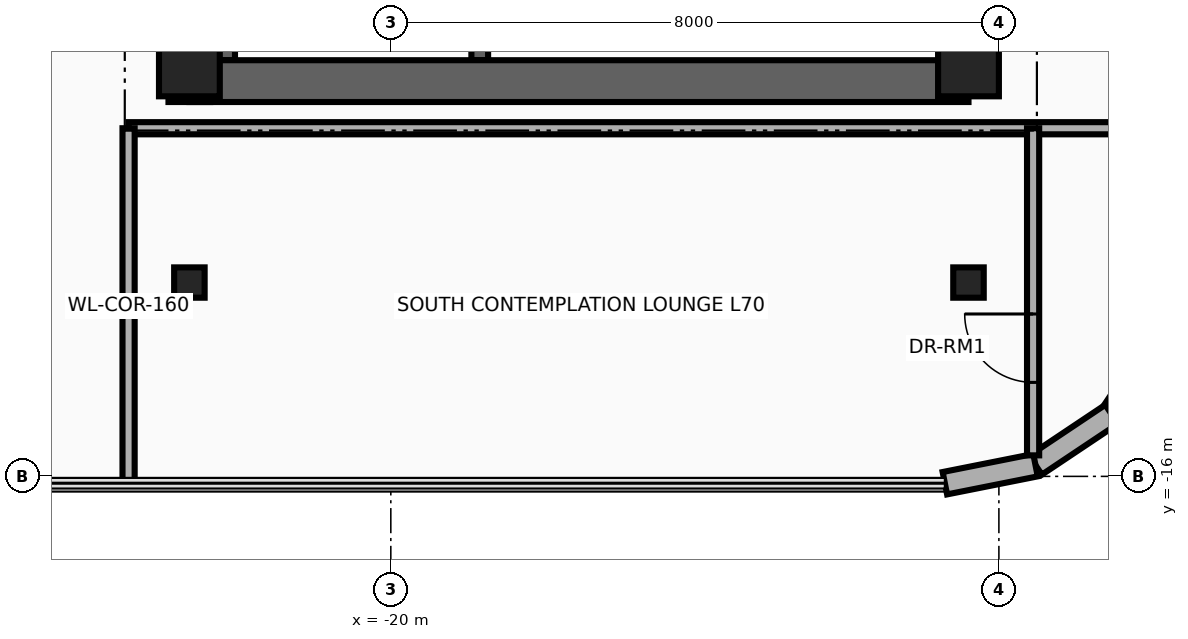
"""IFC4 building model, lengths in metres.
Left out: names, types, materials, properties, quantities, classifications, styles, units other than length and angle.
Written with IfcOpenShell. Run it as: python <this file> out.ifc"""

import sys

from ifc_helpers import new_model, si_unit, direction, frame, frame_2d, origin, origin_2d, place, context, subcontext, project, spatial, rectangle, i_section, extrude, source, transform, mapped, element, fill, save


model = new_model("IFC4")
c1 = context("Model", 3, precision=1e-05, world=origin(), true_north=direction((0.0, 1.0)))
c2 = subcontext(c1, "Body", "Model", "MODEL_VIEW")
j1 = project(units=[si_unit("LENGTHUNIT", "METRE"), si_unit("PLANEANGLEUNIT", "RADIAN")], contexts=[c1])
p1 = place(None, origin())
s1 = spatial("IfcSite", under=j1, at=p1, CompositionType="ELEMENT")
p2 = place(p1, origin())
s2 = spatial("IfcBuilding", under=s1, at=p2, CompositionType="ELEMENT")
p3 = place(p2, frame((0.0, 0.0, 269.5)))
s3 = spatial("IfcBuildingStorey", under=s2, at=p3, CompositionType="ELEMENT", Elevation=269.5)
for number, where, z_axis, x_axis in (
    (1, (-22.16, -10.525, 0.0), (0.0, 0.0, 1.0), (0.0, 1.0, 0.0)),
    (2, (-18.83, -10.525, 0.0), (0.0, 0.0, 1.0), (0.0, 1.0, 0.0)),
):
    element("IfcWall", number, at=place(p3, frame(where, z_axis=z_axis, x_axis=x_axis)), inside=s3, PredefinedType="SHEAR", context=c2, shape_type="SweptSolid", body=[
        extrude(rectangle(XDim=8.745, YDim=0.22, at=frame_2d((4.373, 0.0))), origin(), (0.0, 0.0, 1.0), 3.26),
    ])
p4 = place(p3, frame((-22.65, -11.075, 0.0), z_axis=(0.0, 0.0, 1.0), x_axis=(0.0, 1.0, 0.0)))
e3 = element("IfcWall", 3, at=p4, inside=s3, PredefinedType="SHEAR", context=c2, shape_type="SweptSolid", body=[
    extrude(rectangle(XDim=22.15, YDim=0.55, at=frame_2d((11.075, 0.0))), origin(), (0.0, 0.0, 1.0), 3.26),
])
p5 = place(p3, frame((-22.65, -10.8, 0.0), z_axis=(0.0, 0.0, 1.0), x_axis=(1.0, 0.0, 0.0)))
e4 = element("IfcWall", 4, at=p5, inside=s3, PredefinedType="SHEAR", context=c2, shape_type="SweptSolid", body=[
    extrude(rectangle(XDim=10.25, YDim=0.55, at=frame_2d((5.125, 0.0))), origin(), (0.0, 0.0, 1.0), 3.26),
])
m1 = source(origin(), c2, "Body", "SweptSolid", [
    extrude(rectangle(XDim=0.8, YDim=0.8, at=origin_2d()), origin(), (0.0, 0.0, 1.0), 3.5),
])
for number, where, z_axis, x_axis in (
    (5, (-22.65, -10.6, 0.0), (0.0, 0.0, 1.0), (1.0, 0.0, 0.0)),
    (6, (-12.4, -10.6, 0.0), (0.0, 0.0, 1.0), (1.0, 0.0, 0.0)),
):
    element("IfcColumn", number, at=place(p3, frame(where, z_axis=z_axis, x_axis=x_axis)), inside=s3, PredefinedType="COLUMN", context=c2, shape_type="MappedRepresentation", body=[
        mapped(m1, transform((0.0, 0.0, 0.0), x_axis=(1.0, 0.0, 0.0), y_axis=(0.0, 1.0, 0.0), z_axis=(0.0, 0.0, 1.0), scale=1.0)),
    ])
m2 = source(origin(), c2, "Body", "SweptSolid", [
    extrude(i_section(OverallWidth=0.401, OverallDepth=0.399, WebThickness=0.025, FlangeThickness=0.04, at=origin_2d()), origin(), (0.0, 0.0, 1.0), 3.5),
])
for number, where, z_axis, x_axis in (
    (7, (-22.65, -13.45, 0.0), (0.0, 0.0, 1.0), (1.0, 0.0, 0.0)),
    (8, (-12.4, -13.45, 0.0), (0.0, 0.0, 1.0), (1.0, 0.0, 0.0)),
):
    element("IfcColumn", number, at=place(p3, frame(where, z_axis=z_axis, x_axis=x_axis)), inside=s3, PredefinedType="COLUMN", context=c2, shape_type="MappedRepresentation", body=[
        mapped(m2, transform((0.0, 0.0, 0.0), x_axis=(1.0, 0.0, 0.0), y_axis=(0.0, 1.0, 0.0), z_axis=(0.0, 0.0, 1.0), scale=1.0)),
    ])
for number, where, z_axis, x_axis in (
    (9, (-9.847, -14.182, 0.0), (0.0, 0.0, 1.0), (-0.556, -0.831, 0.0)),
    (10, (-10.517, -15.183, 0.0), (0.0, 0.0, 1.0), (-0.831, -0.556, 0.0)),
):
    element("IfcWall", number, at=place(p3, frame(where, z_axis=z_axis, x_axis=x_axis)), inside=s3, PredefinedType="SOLIDWALL", context=c2, shape_type="SweptSolid", body=[
        extrude(rectangle(XDim=1.205, YDim=0.3, at=frame_2d((0.603, 0.0))), origin(), (0.0, 0.0, 1.0), 3.26),
    ])
p6 = place(p3, frame((-11.518, -15.853, 0.0), z_axis=(0.0, 0.0, 1.0), x_axis=(-0.980765602568, -0.195189223115, 0.0)))
e11 = element("IfcWall", 11, at=p6, inside=s3, PredefinedType="SOLIDWALL", context=c2, shape_type="SweptSolid", body=[
    extrude(rectangle(XDim=1.216, YDim=0.3, at=frame_2d((0.608, 0.0))), origin(), (0.0, 0.0, 1.0), 3.26),
])
p7 = place(p3, frame((-23.45, -11.42, 0.0), z_axis=(0.0, 0.0, 1.0), x_axis=(1.0, 0.0, 0.0)))
e12 = element("IfcWall", 12, at=p7, inside=s3, PredefinedType="PARTITIONING", context=c2, shape_type="SweptSolid", body=[
    extrude(rectangle(XDim=13.84, YDim=0.16, at=frame_2d((6.92, 0.0))), origin(), (0.0, 0.0, 1.0), 2.634),
])
p8 = place(p3, frame((-23.45, -16.09, 0.0), z_axis=(0.0, 0.0, 1.0), x_axis=(0.0, 1.0, 0.0)))
e13 = element("IfcWall", 13, at=p8, inside=s3, PredefinedType="PARTITIONING", context=c2, shape_type="SweptSolid", body=[
    extrude(rectangle(XDim=4.67, YDim=0.16, at=frame_2d((2.335, 0.0))), origin(), (0.0, 0.0, 1.0), 3.26),
])
p9 = place(p3, frame((-11.55, -15.724, 0.0), z_axis=(0.0, 0.0, 1.0), x_axis=(0.0, 1.0, 0.0)))
e14 = element("IfcWall", 14, at=p9, inside=s3, PredefinedType="PARTITIONING", context=c2, shape_type="SweptSolid", body=[
    extrude(rectangle(XDim=4.304, YDim=0.16, at=frame_2d((2.152, 0.0))), origin(), (0.0, 0.0, 1.0), 3.26),
])
p10 = place(p9, frame((0.96, 0.0, 0.0)))
e15 = element("IfcOpeningElement", 15, at=p10, cuts=e14, PredefinedType="OPENING", context=c2, shape_type="SweptSolid", body=[
    extrude(rectangle(XDim=0.9, YDim=2.1, at=frame_2d((0.45, 1.05))), frame((0.0, 0.095, 0.0), z_axis=(0.0, -1.0, 0.0), x_axis=(1.0, 0.0, 0.0)), (0.0, 0.0, 1.0), 0.19),
])
p11 = place(p10, origin())
e16 = element("IfcDoor", 16, at=p11, inside=s3, OperationType="SINGLE_SWING_RIGHT", PredefinedType="DOOR", context=c2, shape_type="SweptSolid", body=[
    extrude(rectangle(XDim=0.9, YDim=2.1, at=frame_2d((0.45, 1.05))), frame((0.0, 0.025, 0.0), z_axis=(0.0, -1.0, 0.0), x_axis=(1.0, 0.0, 0.0)), (0.0, 0.0, 1.0), 0.05),
])
fill(e15, e16)
save(model, sys.argv[1])
